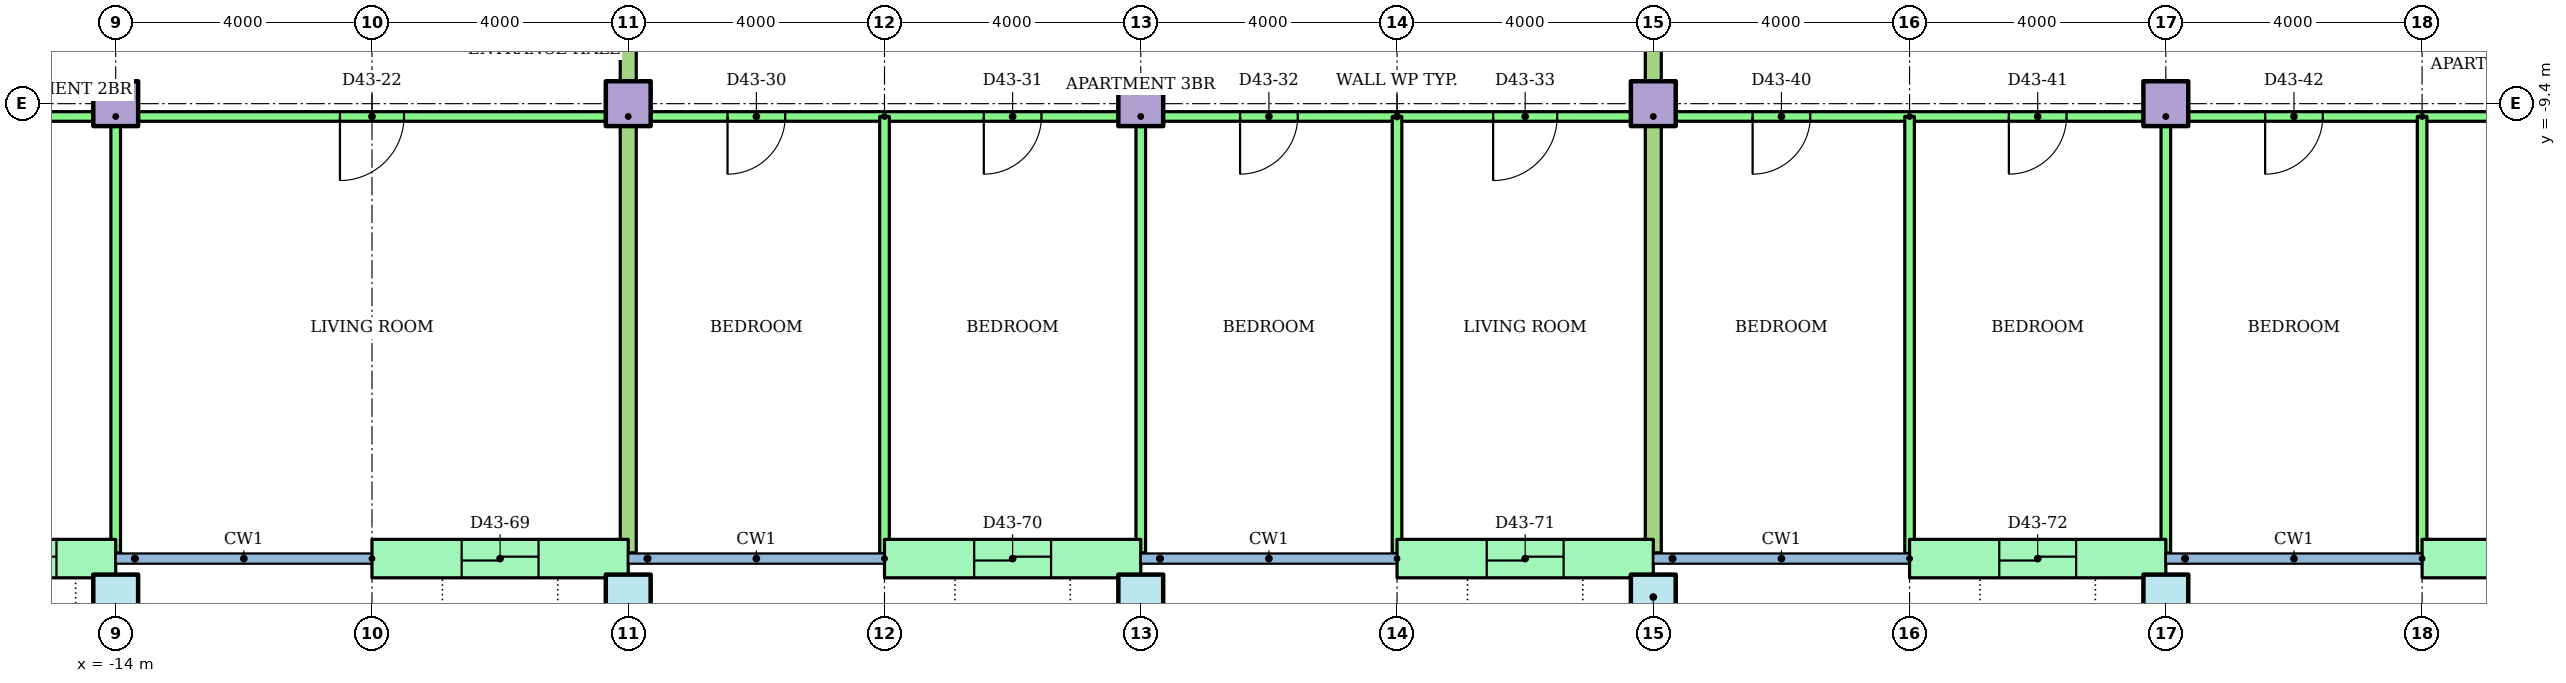
"""IFC4 building model, lengths in metres.
Left out: names, types, materials, properties, quantities, classifications, styles, units other than length and angle.
Written with IfcOpenShell. Run it as: python <this file> out.ifc"""

import sys

from ifc_helpers import new_model, si_unit, direction, frame, frame_2d, origin, origin_2d, place, context, subcontext, project, spatial, rectangle, hollow_rectangle, extrude, element, fill, save


model = new_model("IFC4")
c1 = context("Model", 3, precision=1e-05, world=origin(), true_north=direction((0.0, 1.0)))
c2 = subcontext(c1, "Body", "Model", "MODEL_VIEW")
j1 = project(units=[si_unit("LENGTHUNIT", "METRE"), si_unit("PLANEANGLEUNIT", "RADIAN")], contexts=[c1])
p1 = place(None, origin())
s1 = spatial("IfcSite", under=j1, at=p1, CompositionType="ELEMENT")
p2 = place(p1, origin())
s2 = spatial("IfcBuilding", under=s1, at=p2, CompositionType="ELEMENT")
p3 = place(p2, frame((0.0, 0.0, 168.5)))
s3 = spatial("IfcBuildingStorey", under=s2, at=p3, CompositionType="ELEMENT", Elevation=168.5)
for number, where in (
    (1, (-14.0, -17.1, 0.0)),
    (2, (-6.0, -17.1, 0.0)),
    (3, (2.0, -17.1, 0.0)),
    (4, (10.0, -17.1, 0.0)),
    (5, (18.0, -17.1, 0.0)),
):
    element("IfcColumn", number, at=place(p3, frame(where)), inside=s3, PredefinedType="COLUMN", context=c2, shape_type="SweptSolid", body=[
        extrude(hollow_rectangle(XDim=0.7, YDim=0.7, WallThickness=0.036, at=origin_2d()), origin(), (0.0, 0.0, 1.0), 3.2),
    ])
for number, where in (
    (6, (-14.0, -9.4, 0.0)),
    (7, (-6.0, -9.4, 0.0)),
    (8, (2.0, -9.4, 0.0)),
    (9, (10.0, -9.4, 0.0)),
    (10, (18.0, -9.4, 0.0)),
):
    element("IfcColumn", number, at=place(p3, frame(where)), inside=s3, PredefinedType="COLUMN", context=c2, shape_type="SweptSolid", body=[
        extrude(rectangle(XDim=0.7, YDim=0.7, at=origin_2d()), origin(), (0.0, 0.0, 1.0), 3.2),
    ])
p4 = place(p3, frame((-17.05, -16.5, 0.0)))
e11 = element("IfcWall", 11, at=p4, inside=s3, PredefinedType="STANDARD", context=c2, shape_type="SweptSolid", body=[
    extrude(rectangle(XDim=3.05, YDim=0.6, at=frame_2d((1.525, 0.0))), origin(), (0.0, 0.0, 1.0), 2.92),
])
p5 = place(p4, frame((0.925, 0.0, 0.0)))
e12 = element("IfcOpeningElement", 12, at=p5, cuts=e11, PredefinedType="OPENING", context=c2, shape_type="SweptSolid", body=[
    extrude(rectangle(XDim=1.2, YDim=2.1, at=frame_2d((0.6, 1.05))), frame((0.0, 0.31, 0.0), z_axis=(0.0, -1.0, 0.0), x_axis=(1.0, 0.0, 0.0)), (0.0, 0.0, 1.0), 0.62),
])
p6 = place(p3, frame((-10.0, -16.5, 0.0)))
e13 = element("IfcWall", 13, at=p6, inside=s3, PredefinedType="STANDARD", context=c2, shape_type="SweptSolid", body=[
    extrude(rectangle(XDim=4.0, YDim=0.6, at=frame_2d((2.0, 0.0))), origin(), (0.0, 0.0, 1.0), 2.92),
])
p7 = place(p6, frame((1.4, 0.0, 0.0)))
e14 = element("IfcOpeningElement", 14, at=p7, cuts=e13, PredefinedType="OPENING", context=c2, shape_type="SweptSolid", body=[
    extrude(rectangle(XDim=1.2, YDim=2.1, at=frame_2d((0.6, 1.05))), frame((0.0, 0.31, 0.0), z_axis=(0.0, -1.0, 0.0), x_axis=(1.0, 0.0, 0.0)), (0.0, 0.0, 1.0), 0.62),
])
p8 = place(p3, frame((-2.0, -16.5, 0.0)))
e15 = element("IfcWall", 15, at=p8, inside=s3, PredefinedType="STANDARD", context=c2, shape_type="SweptSolid", body=[
    extrude(rectangle(XDim=4.0, YDim=0.6, at=frame_2d((2.0, 0.0))), origin(), (0.0, 0.0, 1.0), 2.92),
])
p9 = place(p8, frame((1.4, 0.0, 0.0)))
e16 = element("IfcOpeningElement", 16, at=p9, cuts=e15, PredefinedType="OPENING", context=c2, shape_type="SweptSolid", body=[
    extrude(rectangle(XDim=1.2, YDim=2.1, at=frame_2d((0.6, 1.05))), frame((0.0, 0.31, 0.0), z_axis=(0.0, -1.0, 0.0), x_axis=(1.0, 0.0, 0.0)), (0.0, 0.0, 1.0), 0.62),
])
p10 = place(p3, frame((6.0, -16.5, 0.0)))
e17 = element("IfcWall", 17, at=p10, inside=s3, PredefinedType="STANDARD", context=c2, shape_type="SweptSolid", body=[
    extrude(rectangle(XDim=4.0, YDim=0.6, at=frame_2d((2.0, 0.0))), origin(), (0.0, 0.0, 1.0), 2.92),
])
p11 = place(p10, frame((1.4, 0.0, 0.0)))
e18 = element("IfcOpeningElement", 18, at=p11, cuts=e17, PredefinedType="OPENING", context=c2, shape_type="SweptSolid", body=[
    extrude(rectangle(XDim=1.2, YDim=2.1, at=frame_2d((0.6, 1.05))), frame((0.0, 0.31, 0.0), z_axis=(0.0, -1.0, 0.0), x_axis=(1.0, 0.0, 0.0)), (0.0, 0.0, 1.0), 0.62),
])
p12 = place(p3, frame((14.0, -16.5, 0.0)))
e19 = element("IfcWall", 19, at=p12, inside=s3, PredefinedType="STANDARD", context=c2, shape_type="SweptSolid", body=[
    extrude(rectangle(XDim=4.0, YDim=0.6, at=frame_2d((2.0, 0.0))), origin(), (0.0, 0.0, 1.0), 2.92),
])
p13 = place(p12, frame((1.4, 0.0, 0.0)))
e20 = element("IfcOpeningElement", 20, at=p13, cuts=e19, PredefinedType="OPENING", context=c2, shape_type="SweptSolid", body=[
    extrude(rectangle(XDim=1.2, YDim=2.1, at=frame_2d((0.6, 1.05))), frame((0.0, 0.31, 0.0), z_axis=(0.0, -1.0, 0.0), x_axis=(1.0, 0.0, 0.0)), (0.0, 0.0, 1.0), 0.62),
])
p14 = place(p3, frame((22.0, -16.5, 0.0)))
e21 = element("IfcWall", 21, at=p14, inside=s3, PredefinedType="STANDARD", context=c2, shape_type="SweptSolid", body=[
    extrude(rectangle(XDim=4.0, YDim=0.6, at=frame_2d((2.0, 0.0))), origin(), (0.0, 0.0, 1.0), 2.92),
])
p15 = place(p14, frame((1.4, 0.0, 0.0)))
e22 = element("IfcOpeningElement", 22, at=p15, cuts=e21, PredefinedType="OPENING", context=c2, shape_type="SweptSolid", body=[
    extrude(rectangle(XDim=1.2, YDim=2.1, at=frame_2d((0.6, 1.05))), frame((0.0, 0.31, 0.0), z_axis=(0.0, -1.0, 0.0), x_axis=(1.0, 0.0, 0.0)), (0.0, 0.0, 1.0), 0.62),
])
p16 = place(p3, frame((-6.0, -9.6, 0.0), z_axis=(0.0, 0.0, 1.0), x_axis=(-1.0, 0.0, 0.0)))
e23 = element("IfcWall", 23, at=p16, inside=s3, PredefinedType="PARTITIONING", context=c2, shape_type="SweptSolid", body=[
    extrude(rectangle(XDim=18.82, YDim=0.15, at=frame_2d((9.41, 0.0))), origin(), (0.0, 0.0, 1.0), 2.4),
])
p17 = place(p16, frame((16.547, 0.0, 0.0)))
e24 = element("IfcOpeningElement", 24, at=p17, cuts=e23, PredefinedType="OPENING", context=c2, shape_type="SweptSolid", body=[
    extrude(rectangle(XDim=0.9, YDim=2.1, at=frame_2d((0.45, 1.05))), frame((0.0, 0.085, 0.0), z_axis=(0.0, -1.0, 0.0), x_axis=(1.0, 0.0, 0.0)), (0.0, 0.0, 1.0), 0.17),
])
p18 = place(p16, frame((10.45, 0.0, 0.0)))
e25 = element("IfcOpeningElement", 25, at=p18, cuts=e23, PredefinedType="OPENING", context=c2, shape_type="SweptSolid", body=[
    extrude(rectangle(XDim=0.9, YDim=2.1, at=frame_2d((0.45, 1.05))), frame((0.0, 0.085, 0.0), z_axis=(0.0, -1.0, 0.0), x_axis=(1.0, 0.0, 0.0)), (0.0, 0.0, 1.0), 0.17),
])
p19 = place(p16, frame((3.5, 0.0, 0.0)))
e26 = element("IfcOpeningElement", 26, at=p19, cuts=e23, PredefinedType="OPENING", context=c2, shape_type="SweptSolid", body=[
    extrude(rectangle(XDim=1.0, YDim=2.1, at=frame_2d((0.5, 1.05))), frame((0.0, 0.085, 0.0), z_axis=(0.0, -1.0, 0.0), x_axis=(1.0, 0.0, 0.0)), (0.0, 0.0, 1.0), 0.17),
])
p20 = place(p3, frame((-14.0, -9.6, 0.0), z_axis=(0.0, 0.0, 1.0), x_axis=(0.0, -1.0, 0.0)))
e27 = element("IfcWall", 27, at=p20, inside=s3, PredefinedType="PARTITIONING", context=c2, shape_type="SweptSolid", body=[
    extrude(rectangle(XDim=6.81, YDim=0.15, at=frame_2d((3.405, 0.0))), origin(), (0.0, 0.0, 1.0), 2.4),
])
p21 = place(p3, frame((10.0, -9.6, 0.0), z_axis=(0.0, 0.0, 1.0), x_axis=(-1.0, 0.0, 0.0)))
e28 = element("IfcWall", 28, at=p21, inside=s3, PredefinedType="PARTITIONING", context=c2, shape_type="SweptSolid", body=[
    extrude(rectangle(XDim=16.0, YDim=0.15, at=frame_2d((8.0, 0.0))), origin(), (0.0, 0.0, 1.0), 2.4),
])
p22 = place(p21, frame((13.55, 0.0, 0.0)))
e29 = element("IfcOpeningElement", 29, at=p22, cuts=e28, PredefinedType="OPENING", context=c2, shape_type="SweptSolid", body=[
    extrude(rectangle(XDim=0.9, YDim=2.1, at=frame_2d((0.45, 1.05))), frame((0.0, 0.085, 0.0), z_axis=(0.0, -1.0, 0.0), x_axis=(1.0, 0.0, 0.0)), (0.0, 0.0, 1.0), 0.17),
])
p23 = place(p21, frame((9.55, 0.0, 0.0)))
e30 = element("IfcOpeningElement", 30, at=p23, cuts=e28, PredefinedType="OPENING", context=c2, shape_type="SweptSolid", body=[
    extrude(rectangle(XDim=0.9, YDim=2.1, at=frame_2d((0.45, 1.05))), frame((0.0, 0.085, 0.0), z_axis=(0.0, -1.0, 0.0), x_axis=(1.0, 0.0, 0.0)), (0.0, 0.0, 1.0), 0.17),
])
p24 = place(p21, frame((5.55, 0.0, 0.0)))
e31 = element("IfcOpeningElement", 31, at=p24, cuts=e28, PredefinedType="OPENING", context=c2, shape_type="SweptSolid", body=[
    extrude(rectangle(XDim=0.9, YDim=2.1, at=frame_2d((0.45, 1.05))), frame((0.0, 0.085, 0.0), z_axis=(0.0, -1.0, 0.0), x_axis=(1.0, 0.0, 0.0)), (0.0, 0.0, 1.0), 0.17),
])
p25 = place(p21, frame((1.5, 0.0, 0.0)))
e32 = element("IfcOpeningElement", 32, at=p25, cuts=e28, PredefinedType="OPENING", context=c2, shape_type="SweptSolid", body=[
    extrude(rectangle(XDim=1.0, YDim=2.1, at=frame_2d((0.5, 1.05))), frame((0.0, 0.085, 0.0), z_axis=(0.0, -1.0, 0.0), x_axis=(1.0, 0.0, 0.0)), (0.0, 0.0, 1.0), 0.17),
])
p26 = place(p3, frame((-2.0, -9.6, 0.0), z_axis=(0.0, 0.0, 1.0), x_axis=(0.0, -1.0, 0.0)))
e33 = element("IfcWall", 33, at=p26, inside=s3, PredefinedType="PARTITIONING", context=c2, shape_type="SweptSolid", body=[
    extrude(rectangle(XDim=6.821, YDim=0.15, at=frame_2d((3.41, 0.0))), origin(), (0.0, 0.0, 1.0), 2.4),
])
p27 = place(p3, frame((2.0, -9.6, 0.0), z_axis=(0.0, 0.0, 1.0), x_axis=(0.0, -1.0, 0.0)))
e34 = element("IfcWall", 34, at=p27, inside=s3, PredefinedType="PARTITIONING", context=c2, shape_type="SweptSolid", body=[
    extrude(rectangle(XDim=6.81, YDim=0.15, at=frame_2d((3.405, 0.0))), origin(), (0.0, 0.0, 1.0), 2.4),
])
p28 = place(p3, frame((6.0, -9.6, 0.0), z_axis=(0.0, 0.0, 1.0), x_axis=(0.0, -1.0, 0.0)))
e35 = element("IfcWall", 35, at=p28, inside=s3, PredefinedType="PARTITIONING", context=c2, shape_type="SweptSolid", body=[
    extrude(rectangle(XDim=6.821, YDim=0.15, at=frame_2d((3.41, 0.0))), origin(), (0.0, 0.0, 1.0), 2.4),
])
p29 = place(p3, frame((-6.0, -1.4, 0.0), z_axis=(0.0, 0.0, 1.0), x_axis=(0.0, -1.0, 0.0)))
e36 = element("IfcWall", 36, at=p29, inside=s3, PredefinedType="PARTITIONING", context=c2, shape_type="SweptSolid", body=[
    extrude(rectangle(XDim=15.01, YDim=0.25, at=frame_2d((7.505, 0.0))), origin(), (0.0, 0.0, 1.0), 2.4),
])
p30 = place(p3, frame((36.82, -9.6, 0.0), z_axis=(0.0, 0.0, 1.0), x_axis=(-1.0, 0.0, 0.0)))
e37 = element("IfcWall", 37, at=p30, inside=s3, PredefinedType="PARTITIONING", context=c2, shape_type="SweptSolid", body=[
    extrude(rectangle(XDim=26.82, YDim=0.15, at=frame_2d((13.41, 0.0))), origin(), (0.0, 0.0, 1.0), 2.4),
])
p31 = place(p30, frame((24.37, 0.0, 0.0)))
e38 = element("IfcOpeningElement", 38, at=p31, cuts=e37, PredefinedType="OPENING", context=c2, shape_type="SweptSolid", body=[
    extrude(rectangle(XDim=0.9, YDim=2.1, at=frame_2d((0.45, 1.05))), frame((0.0, 0.085, 0.0), z_axis=(0.0, -1.0, 0.0), x_axis=(1.0, 0.0, 0.0)), (0.0, 0.0, 1.0), 0.17),
])
p32 = place(p30, frame((20.37, 0.0, 0.0)))
e39 = element("IfcOpeningElement", 39, at=p32, cuts=e37, PredefinedType="OPENING", context=c2, shape_type="SweptSolid", body=[
    extrude(rectangle(XDim=0.9, YDim=2.1, at=frame_2d((0.45, 1.05))), frame((0.0, 0.085, 0.0), z_axis=(0.0, -1.0, 0.0), x_axis=(1.0, 0.0, 0.0)), (0.0, 0.0, 1.0), 0.17),
])
p33 = place(p30, frame((16.37, 0.0, 0.0)))
e40 = element("IfcOpeningElement", 40, at=p33, cuts=e37, PredefinedType="OPENING", context=c2, shape_type="SweptSolid", body=[
    extrude(rectangle(XDim=0.9, YDim=2.1, at=frame_2d((0.45, 1.05))), frame((0.0, 0.085, 0.0), z_axis=(0.0, -1.0, 0.0), x_axis=(1.0, 0.0, 0.0)), (0.0, 0.0, 1.0), 0.17),
])
p34 = place(p30, frame((9.27, 0.0, 0.0)))
e41 = element("IfcOpeningElement", 41, at=p34, cuts=e37, PredefinedType="OPENING", context=c2, shape_type="SweptSolid", body=[
    extrude(rectangle(XDim=1.0, YDim=2.1, at=frame_2d((0.5, 1.05))), frame((0.0, 0.085, 0.0), z_axis=(0.0, -1.0, 0.0), x_axis=(1.0, 0.0, 0.0)), (0.0, 0.0, 1.0), 0.17),
])
p35 = place(p30, frame((1.373, 0.0, 0.0)))
e42 = element("IfcOpeningElement", 42, at=p35, cuts=e37, PredefinedType="OPENING", context=c2, shape_type="SweptSolid", body=[
    extrude(rectangle(XDim=0.9, YDim=2.1, at=frame_2d((0.45, 1.05))), frame((0.0, 0.085, 0.0), z_axis=(0.0, -1.0, 0.0), x_axis=(1.0, 0.0, 0.0)), (0.0, 0.0, 1.0), 0.17),
])
p36 = place(p3, frame((14.0, -9.6, 0.0), z_axis=(0.0, 0.0, 1.0), x_axis=(0.0, -1.0, 0.0)))
e43 = element("IfcWall", 43, at=p36, inside=s3, PredefinedType="PARTITIONING", context=c2, shape_type="SweptSolid", body=[
    extrude(rectangle(XDim=6.821, YDim=0.15, at=frame_2d((3.41, 0.0))), origin(), (0.0, 0.0, 1.0), 2.4),
])
p37 = place(p3, frame((18.0, -9.6, 0.0), z_axis=(0.0, 0.0, 1.0), x_axis=(0.0, -1.0, 0.0)))
e44 = element("IfcWall", 44, at=p37, inside=s3, PredefinedType="PARTITIONING", context=c2, shape_type="SweptSolid", body=[
    extrude(rectangle(XDim=6.81, YDim=0.15, at=frame_2d((3.405, 0.0))), origin(), (0.0, 0.0, 1.0), 2.4),
])
p38 = place(p3, frame((22.0, -9.6, 0.0), z_axis=(0.0, 0.0, 1.0), x_axis=(0.0, -1.0, 0.0)))
e45 = element("IfcWall", 45, at=p38, inside=s3, PredefinedType="PARTITIONING", context=c2, shape_type="SweptSolid", body=[
    extrude(rectangle(XDim=6.821, YDim=0.15, at=frame_2d((3.41, 0.0))), origin(), (0.0, 0.0, 1.0), 2.4),
])
p39 = place(p3, frame((10.0, -1.4, 0.0), z_axis=(0.0, 0.0, 1.0), x_axis=(0.0, -1.0, 0.0)))
e46 = element("IfcWall", 46, at=p39, inside=s3, PredefinedType="PARTITIONING", context=c2, shape_type="SweptSolid", body=[
    extrude(rectangle(XDim=15.01, YDim=0.25, at=frame_2d((7.505, 0.0))), origin(), (0.0, 0.0, 1.0), 2.4),
])
p40 = place(p19, origin())
e47 = element("IfcDoor", 47, at=p40, inside=s3, OperationType="SINGLE_SWING_RIGHT", PredefinedType="DOOR", context=c2, shape_type="SweptSolid", body=[
    extrude(rectangle(XDim=1.0, YDim=2.1, at=frame_2d((0.5, 1.05))), frame((0.0, 0.025, 0.0), z_axis=(0.0, -1.0, 0.0), x_axis=(1.0, 0.0, 0.0)), (0.0, 0.0, 1.0), 0.05),
])
fill(e26, e47)
p41 = place(p22, origin())
e48 = element("IfcDoor", 48, at=p41, inside=s3, OperationType="SINGLE_SWING_RIGHT", PredefinedType="DOOR", context=c2, shape_type="SweptSolid", body=[
    extrude(rectangle(XDim=0.9, YDim=2.1, at=frame_2d((0.45, 1.05))), frame((0.0, 0.025, 0.0), z_axis=(0.0, -1.0, 0.0), x_axis=(1.0, 0.0, 0.0)), (0.0, 0.0, 1.0), 0.05),
])
fill(e29, e48)
p42 = place(p23, origin())
e49 = element("IfcDoor", 49, at=p42, inside=s3, OperationType="SINGLE_SWING_RIGHT", PredefinedType="DOOR", context=c2, shape_type="SweptSolid", body=[
    extrude(rectangle(XDim=0.9, YDim=2.1, at=frame_2d((0.45, 1.05))), frame((0.0, 0.025, 0.0), z_axis=(0.0, -1.0, 0.0), x_axis=(1.0, 0.0, 0.0)), (0.0, 0.0, 1.0), 0.05),
])
fill(e30, e49)
p43 = place(p24, origin())
e50 = element("IfcDoor", 50, at=p43, inside=s3, OperationType="SINGLE_SWING_RIGHT", PredefinedType="DOOR", context=c2, shape_type="SweptSolid", body=[
    extrude(rectangle(XDim=0.9, YDim=2.1, at=frame_2d((0.45, 1.05))), frame((0.0, 0.025, 0.0), z_axis=(0.0, -1.0, 0.0), x_axis=(1.0, 0.0, 0.0)), (0.0, 0.0, 1.0), 0.05),
])
fill(e31, e50)
p44 = place(p25, origin())
e51 = element("IfcDoor", 51, at=p44, inside=s3, OperationType="SINGLE_SWING_RIGHT", PredefinedType="DOOR", context=c2, shape_type="SweptSolid", body=[
    extrude(rectangle(XDim=1.0, YDim=2.1, at=frame_2d((0.5, 1.05))), frame((0.0, 0.025, 0.0), z_axis=(0.0, -1.0, 0.0), x_axis=(1.0, 0.0, 0.0)), (0.0, 0.0, 1.0), 0.05),
])
fill(e32, e51)
p45 = place(p31, origin())
e52 = element("IfcDoor", 52, at=p45, inside=s3, OperationType="SINGLE_SWING_RIGHT", PredefinedType="DOOR", context=c2, shape_type="SweptSolid", body=[
    extrude(rectangle(XDim=0.9, YDim=2.1, at=frame_2d((0.45, 1.05))), frame((0.0, 0.025, 0.0), z_axis=(0.0, -1.0, 0.0), x_axis=(1.0, 0.0, 0.0)), (0.0, 0.0, 1.0), 0.05),
])
fill(e38, e52)
p46 = place(p32, origin())
e53 = element("IfcDoor", 53, at=p46, inside=s3, OperationType="SINGLE_SWING_RIGHT", PredefinedType="DOOR", context=c2, shape_type="SweptSolid", body=[
    extrude(rectangle(XDim=0.9, YDim=2.1, at=frame_2d((0.45, 1.05))), frame((0.0, 0.025, 0.0), z_axis=(0.0, -1.0, 0.0), x_axis=(1.0, 0.0, 0.0)), (0.0, 0.0, 1.0), 0.05),
])
fill(e39, e53)
p47 = place(p33, origin())
e54 = element("IfcDoor", 54, at=p47, inside=s3, OperationType="SINGLE_SWING_RIGHT", PredefinedType="DOOR", context=c2, shape_type="SweptSolid", body=[
    extrude(rectangle(XDim=0.9, YDim=2.1, at=frame_2d((0.45, 1.05))), frame((0.0, 0.025, 0.0), z_axis=(0.0, -1.0, 0.0), x_axis=(1.0, 0.0, 0.0)), (0.0, 0.0, 1.0), 0.05),
])
fill(e40, e54)
p48 = place(p5, origin())
e55 = element("IfcDoor", 55, at=p48, inside=s3, OperationType="SLIDING_TO_LEFT", PredefinedType="DOOR", context=c2, shape_type="SweptSolid", body=[
    extrude(rectangle(XDim=1.2, YDim=2.1, at=frame_2d((0.6, 1.05))), frame((0.0, 0.025, 0.0), z_axis=(0.0, -1.0, 0.0), x_axis=(1.0, 0.0, 0.0)), (0.0, 0.0, 1.0), 0.05),
])
fill(e12, e55)
p49 = place(p7, origin())
e56 = element("IfcDoor", 56, at=p49, inside=s3, OperationType="SLIDING_TO_LEFT", PredefinedType="DOOR", context=c2, shape_type="SweptSolid", body=[
    extrude(rectangle(XDim=1.2, YDim=2.1, at=frame_2d((0.6, 1.05))), frame((0.0, 0.025, 0.0), z_axis=(0.0, -1.0, 0.0), x_axis=(1.0, 0.0, 0.0)), (0.0, 0.0, 1.0), 0.05),
])
fill(e14, e56)
p50 = place(p9, origin())
e57 = element("IfcDoor", 57, at=p50, inside=s3, OperationType="SLIDING_TO_LEFT", PredefinedType="DOOR", context=c2, shape_type="SweptSolid", body=[
    extrude(rectangle(XDim=1.2, YDim=2.1, at=frame_2d((0.6, 1.05))), frame((0.0, 0.025, 0.0), z_axis=(0.0, -1.0, 0.0), x_axis=(1.0, 0.0, 0.0)), (0.0, 0.0, 1.0), 0.05),
])
fill(e16, e57)
p51 = place(p11, origin())
e58 = element("IfcDoor", 58, at=p51, inside=s3, OperationType="SLIDING_TO_LEFT", PredefinedType="DOOR", context=c2, shape_type="SweptSolid", body=[
    extrude(rectangle(XDim=1.2, YDim=2.1, at=frame_2d((0.6, 1.05))), frame((0.0, 0.025, 0.0), z_axis=(0.0, -1.0, 0.0), x_axis=(1.0, 0.0, 0.0)), (0.0, 0.0, 1.0), 0.05),
])
fill(e18, e58)
p52 = place(p13, origin())
e59 = element("IfcDoor", 59, at=p52, inside=s3, OperationType="SLIDING_TO_LEFT", PredefinedType="DOOR", context=c2, shape_type="SweptSolid", body=[
    extrude(rectangle(XDim=1.2, YDim=2.1, at=frame_2d((0.6, 1.05))), frame((0.0, 0.025, 0.0), z_axis=(0.0, -1.0, 0.0), x_axis=(1.0, 0.0, 0.0)), (0.0, 0.0, 1.0), 0.05),
])
fill(e20, e59)
save(model, sys.argv[1])
